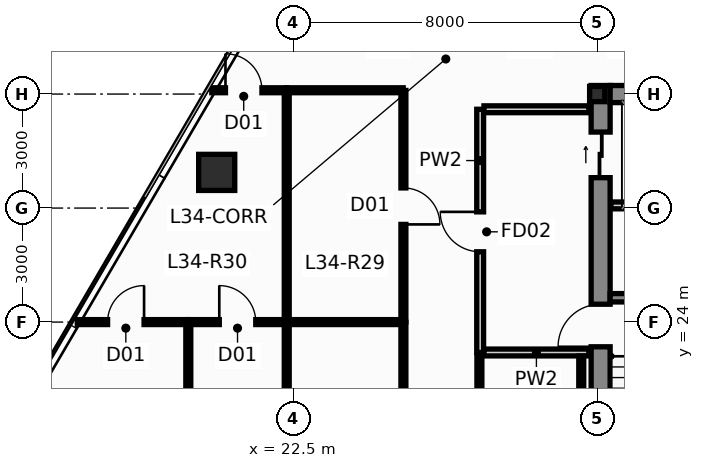
"""IFC4 building model, lengths in metres.
Left out: names, types, materials, properties, quantities, classifications, styles, units other than length and angle.
Written with IfcOpenShell. Run it as: python <this file> out.ifc"""

import sys

from ifc_helpers import new_model, si_unit, direction, frame, frame_2d, origin, origin_2d, place, context, subcontext, project, spatial, rectangle, hollow_rectangle, i_section, extrude, source, transform, mapped, element, fill, save


model = new_model("IFC4")
c1 = context("Model", 3, precision=1e-05, world=origin(), true_north=direction((0.0, 1.0)))
c2 = subcontext(c1, "Body", "Model", "MODEL_VIEW")
j1 = project(units=[si_unit("LENGTHUNIT", "METRE"), si_unit("PLANEANGLEUNIT", "RADIAN")], contexts=[c1])
p1 = place(None, origin())
s1 = spatial("IfcSite", under=j1, at=p1, CompositionType="ELEMENT")
p2 = place(p1, origin())
s2 = spatial("IfcBuilding", under=s1, at=p2, CompositionType="ELEMENT")
p3 = place(p2, frame((0.0, 0.0, 131.8)))
s3 = spatial("IfcBuildingStorey", under=s2, at=p3, CompositionType="ELEMENT", Elevation=131.8)
m1 = source(origin(), c2, "Body", "SweptSolid", [
    extrude(i_section(OverallWidth=0.4, OverallDepth=0.4, WebThickness=0.02, FlangeThickness=0.032, at=origin_2d()), origin(), (0.0, 0.0, 1.0), 3.65),
])
p4 = place(p3, frame((30.5, 30.0, 0.0), z_axis=(0.0, 0.0, 1.0), x_axis=(1.0, 0.0, 0.0)))
e1 = element("IfcColumn", 1, at=p4, inside=s3, PredefinedType="COLUMN", context=c2, shape_type="MappedRepresentation", body=[
    mapped(m1, transform((0.0, 0.0, 0.0), scale=1.0)),
])
p5 = place(p3, frame((30.59, 16.95, 0.0), z_axis=(0.0, 0.0, 1.0), x_axis=(0.0, 1.0, 0.0)))
e2 = element("IfcWall", 2, at=p5, inside=s3, PredefinedType="SHEAR", context=c2, shape_type="SweptSolid", body=[
    extrude(rectangle(XDim=13.275, YDim=0.5, at=frame_2d((6.638, 0.0))), origin(), (0.0, 0.0, 1.0), 3.65),
])
p6 = place(p5, frame((6.4, 0.0, 0.0)))
e3 = element("IfcOpeningElement", 3, at=p6, cuts=e2, PredefinedType="OPENING", context=c2, shape_type="SweptSolid", body=[
    extrude(rectangle(XDim=1.12, YDim=2.15, at=frame_2d((0.56, 1.075))), frame((0.0, 0.262, 0.0), z_axis=(0.0, -1.0, 0.0), x_axis=(1.0, 0.0, 0.0)), (0.0, 0.0, 1.0), 0.524),
])
p7 = place(p5, frame((10.85, 0.0, 0.0)))
e4 = element("IfcOpeningElement", 4, at=p7, cuts=e2, PredefinedType="OPENING", context=c2, shape_type="SweptSolid", body=[
    extrude(rectangle(XDim=1.2, YDim=2.2, at=frame_2d((0.6, 1.1))), frame((0.0, 0.262, 0.0), z_axis=(0.0, -1.0, 0.0), x_axis=(1.0, 0.0, 0.0)), (0.0, 0.0, 1.0), 0.524),
])
p8 = place(p3, frame((30.84, 30.0, 0.0), z_axis=(0.0, 0.0, 1.0), x_axis=(1.0, 0.0, 0.0)))
e5 = element("IfcWall", 5, at=p8, inside=s3, PredefinedType="SHEAR", context=c2, shape_type="SweptSolid", body=[
    extrude(rectangle(XDim=2.9, YDim=0.45, at=frame_2d((1.45, 0.0))), origin(), (0.0, 0.0, 1.0), 3.65),
])
p9 = place(p3, frame((30.84, 24.64, 0.0), z_axis=(0.0, 0.0, 1.0), x_axis=(1.0, 0.0, 0.0)))
e6 = element("IfcWall", 6, at=p9, inside=s3, PredefinedType="SHEAR", context=c2, shape_type="SweptSolid", body=[
    extrude(rectangle(XDim=2.9, YDim=0.22, at=frame_2d((1.45, 0.0))), origin(), (0.0, 0.0, 1.0), 3.65),
])
m2 = source(origin(), c2, "Body", "SweptSolid", [
    extrude(hollow_rectangle(XDim=0.95, YDim=0.95, WallThickness=0.05, at=origin_2d()), origin(), (0.0, 0.0, 1.0), 3.651),
])
p10 = place(p3, frame((20.487, 27.939, 0.0), z_axis=(0.014913313399, -0.013776424037, 0.999793880369), x_axis=(0.678553674548, 0.734550822447, 0.0)))
e7 = element("IfcColumn", 7, at=p10, inside=s3, PredefinedType="COLUMN", context=c2, shape_type="MappedRepresentation", body=[
    mapped(m2, transform((0.0, 0.0, 0.0), scale=1.0)),
])
p11 = place(p3, frame((27.42, 23.2, 0.0), z_axis=(0.0, 0.0, 1.0), x_axis=(0.0, 1.0, 0.0)))
e8 = element("IfcWall", 8, at=p11, inside=s3, PredefinedType="PARTITIONING", context=c2, shape_type="SweptSolid", body=[
    extrude(rectangle(XDim=6.4, YDim=0.18, at=frame_2d((3.2, 0.0))), origin(), (0.0, 0.0, 1.0), 3.078),
])
p12 = place(p11, frame((2.65, 0.0, 0.0)))
e9 = element("IfcOpeningElement", 9, at=p12, cuts=e8, PredefinedType="OPENING", context=c2, shape_type="SweptSolid", body=[
    extrude(rectangle(XDim=1.05, YDim=2.15, at=frame_2d((0.525, 1.075))), frame((0.0, 0.102, 0.0), z_axis=(0.0, -1.0, 0.0), x_axis=(1.0, 0.0, 0.0)), (0.0, 0.0, 1.0), 0.204),
])
p13 = place(p3, frame((27.52, 23.2, 0.0), z_axis=(0.0, 0.0, 1.0), x_axis=(1.0, 0.0, 0.0)))
e10 = element("IfcWall", 10, at=p13, inside=s3, PredefinedType="PARTITIONING", context=c2, shape_type="SweptSolid", body=[
    extrude(rectangle(XDim=2.76, YDim=0.18, at=frame_2d((1.38, 0.0))), origin(), (0.0, 0.0, 1.0), 3.4),
])
p14 = place(p3, frame((27.52, 29.6, 0.0), z_axis=(0.0, 0.0, 1.0), x_axis=(1.0, 0.0, 0.0)))
e11 = element("IfcWall", 11, at=p14, inside=s3, PredefinedType="PARTITIONING", context=c2, shape_type="SweptSolid", body=[
    extrude(rectangle(XDim=2.76, YDim=0.18, at=frame_2d((1.38, 0.0))), origin(), (0.0, 0.0, 1.0), 2.925),
])
p15 = place(p3, frame((30.86, 27.07, 0.0), z_axis=(0.0, 0.0, 1.0), x_axis=(1.0, 0.0, 0.0)))
e12 = element("IfcWall", 12, at=p15, inside=s3, PredefinedType="PARTITIONING", context=c2, shape_type="SweptSolid", body=[
    extrude(rectangle(XDim=2.9, YDim=0.18, at=frame_2d((1.45, 0.0))), origin(), (0.0, 0.0, 1.0), 3.4),
])
p16 = place(p3, frame((19.74, 5.697, 0.0), z_axis=(0.0, 0.0, 1.0), x_axis=(0.0, 1.0, 0.0)))
e13 = element("IfcWall", 13, at=p16, inside=s3, PredefinedType="PARTITIONING", context=c2, shape_type="SweptSolid", body=[
    extrude(rectangle(XDim=18.299, YDim=0.13, at=frame_2d((9.149, 0.0))), origin(), (0.0, 0.0, 1.0), 3.4),
])
p17 = place(p3, frame((22.33, 5.729, 0.0), z_axis=(0.0, 0.0, 1.0), x_axis=(0.0, 1.0, 0.0)))
e14 = element("IfcWall", 14, at=p17, inside=s3, PredefinedType="PARTITIONING", context=c2, shape_type="SweptSolid", body=[
    extrude(rectangle(XDim=18.266, YDim=0.13, at=frame_2d((9.133, 0.0))), origin(), (0.0, 0.0, 1.0), 3.078),
])
p18 = place(p3, frame((30.08, 5.826, 0.0), z_axis=(0.0, 0.0, 1.0), x_axis=(0.0, 1.0, 0.0)))
e15 = element("IfcWall", 15, at=p18, inside=s3, PredefinedType="PARTITIONING", context=c2, shape_type="SweptSolid", body=[
    extrude(rectangle(XDim=17.279, YDim=0.13, at=frame_2d((8.639, 0.0))), origin(), (0.0, 0.0, 1.0), 2.925),
])
p19 = place(p18, frame((8.207, 0.0, 0.0)))
e16 = element("IfcOpeningElement", 16, at=p19, cuts=e15, PredefinedType="OPENING", context=c2, shape_type="SweptSolid", body=[
    extrude(rectangle(XDim=0.96, YDim=2.15, at=frame_2d((0.48, 1.075))), frame((0.0, 0.077, 0.0), z_axis=(0.0, -1.0, 0.0), x_axis=(1.0, 0.0, 0.0)), (0.0, 0.0, 1.0), 0.154),
])
p20 = place(p3, frame((25.4, 15.205, 0.0), z_axis=(0.0, 0.0, 1.0), x_axis=(0.0, 1.0, 0.0)))
e17 = element("IfcWall", 17, at=p20, inside=s3, PredefinedType="PARTITIONING", context=c2, shape_type="SweptSolid", body=[
    extrude(rectangle(XDim=8.79, YDim=0.13, at=frame_2d((4.395, 0.0))), origin(), (0.0, 0.0, 1.0), 3.078),
])
p21 = place(p20, frame((3.915, 0.0, 0.0)))
e18 = element("IfcOpeningElement", 18, at=p21, cuts=e17, PredefinedType="OPENING", context=c2, shape_type="SweptSolid", body=[
    extrude(rectangle(XDim=0.96, YDim=2.15, at=frame_2d((0.48, 1.075))), frame((0.0, 0.077, 0.0), z_axis=(0.0, -1.0, 0.0), x_axis=(1.0, 0.0, 0.0)), (0.0, 0.0, 1.0), 0.154),
])
p22 = place(p3, frame((27.4, 15.205, 0.0), z_axis=(0.0, 0.0, 1.0), x_axis=(0.0, 1.0, 0.0)))
e19 = element("IfcWall", 19, at=p22, inside=s3, PredefinedType="PARTITIONING", context=c2, shape_type="SweptSolid", body=[
    extrude(rectangle(XDim=7.9, YDim=0.13, at=frame_2d((3.95, 0.0))), origin(), (0.0, 0.0, 1.0), 3.4),
])
p23 = place(p22, frame((3.47, 0.0, 0.0)))
e20 = element("IfcOpeningElement", 20, at=p23, cuts=e19, PredefinedType="OPENING", context=c2, shape_type="SweptSolid", body=[
    extrude(rectangle(XDim=0.96, YDim=2.15, at=frame_2d((0.48, 1.075))), frame((0.0, 0.077, 0.0), z_axis=(0.0, -1.0, 0.0), x_axis=(1.0, 0.0, 0.0)), (0.0, 0.0, 1.0), 0.154),
])
p24 = place(p3, frame((25.4, 30.095, 0.0), z_axis=(0.0, 0.0, 1.0), x_axis=(0.0, -1.0, 0.0)))
e21 = element("IfcWall", 21, at=p24, inside=s3, PredefinedType="PARTITIONING", context=c2, shape_type="SweptSolid", body=[
    extrude(rectangle(XDim=6.09, YDim=0.13, at=frame_2d((3.045, 0.0))), origin(), (0.0, 0.0, 1.0), 3.078),
])
p25 = place(p24, frame((2.565, 0.0, 0.0)))
e22 = element("IfcOpeningElement", 22, at=p25, cuts=e21, PredefinedType="OPENING", context=c2, shape_type="SweptSolid", body=[
    extrude(rectangle(XDim=0.96, YDim=2.15, at=frame_2d((0.48, 1.075))), frame((0.0, 0.077, 0.0), z_axis=(0.0, -1.0, 0.0), x_axis=(1.0, 0.0, 0.0)), (0.0, 0.0, 1.0), 0.154),
])
p26 = place(p3, frame((22.33, 24.005, 0.0), z_axis=(0.0, 0.0, 1.0), x_axis=(0.0, 1.0, 0.0)))
e23 = element("IfcWall", 23, at=p26, inside=s3, PredefinedType="PARTITIONING", context=c2, shape_type="SweptSolid", body=[
    extrude(rectangle(XDim=6.09, YDim=0.13, at=frame_2d((3.045, 0.0))), origin(), (0.0, 0.0, 1.0), 3.078),
])
for number, where, z_axis, x_axis in (
    (24, (22.335, 30.1, 0.0), (0.0, 0.0, 1.0), (1.0, 0.0, 0.0)),
    (25, (22.335, 24.0, 0.0), (0.0, 0.0, 1.0), (1.0, 0.0, 0.0)),
):
    element("IfcWall", number, at=place(p3, frame(where, z_axis=z_axis, x_axis=x_axis)), inside=s3, PredefinedType="PARTITIONING", context=c2, shape_type="SweptSolid", body=[
        extrude(rectangle(XDim=3.06, YDim=0.13, at=frame_2d((1.53, 0.0))), origin(), (0.0, 0.0, 1.0), 3.4),
    ])
p27 = place(p3, frame((19.745, 24.0, 0.0), z_axis=(0.0, 0.0, 1.0), x_axis=(1.0, 0.0, 0.0)))
e26 = element("IfcWall", 26, at=p27, inside=s3, PredefinedType="PARTITIONING", context=c2, shape_type="SweptSolid", body=[
    extrude(rectangle(XDim=2.58, YDim=0.13, at=frame_2d((1.29, 0.0))), origin(), (0.0, 0.0, 1.0), 3.4),
])
p28 = place(p27, frame((0.81, 0.0, 0.0)))
e27 = element("IfcOpeningElement", 27, at=p28, cuts=e26, PredefinedType="OPENING", context=c2, shape_type="SweptSolid", body=[
    extrude(rectangle(XDim=0.96, YDim=2.15, at=frame_2d((0.48, 1.075))), frame((0.0, 0.077, 0.0), z_axis=(0.0, -1.0, 0.0), x_axis=(1.0, 0.0, 0.0)), (0.0, 0.0, 1.0), 0.154),
])
p29 = place(p3, frame((16.819, 24.0, 0.0), z_axis=(0.0, 0.0, 1.0), x_axis=(1.0, 0.0, 0.0)))
e28 = element("IfcWall", 28, at=p29, inside=s3, PredefinedType="PARTITIONING", context=c2, shape_type="SweptSolid", body=[
    extrude(rectangle(XDim=2.916, YDim=0.13, at=frame_2d((1.458, 0.0))), origin(), (0.0, 0.0, 1.0), 3.4),
])
p30 = place(p29, frame((0.797, 0.0, 0.0)))
e29 = element("IfcOpeningElement", 29, at=p30, cuts=e28, PredefinedType="OPENING", context=c2, shape_type="SweptSolid", body=[
    extrude(rectangle(XDim=0.96, YDim=2.15, at=frame_2d((0.48, 1.075))), frame((0.0, 0.077, 0.0), z_axis=(0.0, -1.0, 0.0), x_axis=(1.0, 0.0, 0.0)), (0.0, 0.0, 1.0), 0.154),
])
p31 = place(p3, frame((20.358, 30.1, 0.0), z_axis=(0.0, 0.0, 1.0), x_axis=(1.0, 0.0, 0.0)))
e30 = element("IfcWall", 30, at=p31, inside=s3, PredefinedType="PARTITIONING", context=c2, shape_type="SweptSolid", body=[
    extrude(rectangle(XDim=1.967, YDim=0.13, at=frame_2d((0.983, 0.0))), origin(), (0.0, 0.0, 1.0), 3.4),
])
p32 = place(p31, frame((0.36, 0.0, 0.0)))
e31 = element("IfcOpeningElement", 31, at=p32, cuts=e30, PredefinedType="OPENING", context=c2, shape_type="SweptSolid", body=[
    extrude(rectangle(XDim=0.96, YDim=2.15, at=frame_2d((0.48, 1.075))), frame((0.0, 0.077, 0.0), z_axis=(0.0, -1.0, 0.0), x_axis=(1.0, 0.0, 0.0)), (0.0, 0.0, 1.0), 0.154),
])
p33 = place(p6, origin())
e32 = element("IfcDoor", 32, at=p33, inside=s3, OperationType="SINGLE_SWING_LEFT", PredefinedType="DOOR", context=c2, shape_type="SweptSolid", body=[
    extrude(rectangle(XDim=1.12, YDim=2.15, at=frame_2d((0.56, 1.075))), frame((0.0, 0.025, 0.0), z_axis=(0.0, -1.0, 0.0), x_axis=(1.0, 0.0, 0.0)), (0.0, 0.0, 1.0), 0.05),
])
fill(e3, e32)
p34 = place(p7, origin())
e33 = element("IfcDoor", 33, at=p34, inside=s3, OperationType="SLIDING_TO_LEFT", PredefinedType="DOOR", context=c2, shape_type="SweptSolid", body=[
    extrude(rectangle(XDim=1.2, YDim=2.2, at=frame_2d((0.6, 1.1))), frame((0.0, 0.025, 0.0), z_axis=(0.0, -1.0, 0.0), x_axis=(1.0, 0.0, 0.0)), (0.0, 0.0, 1.0), 0.05),
])
fill(e4, e33)
p35 = place(p12, origin())
e34 = element("IfcDoor", 34, at=p35, inside=s3, OperationType="SINGLE_SWING_RIGHT", PredefinedType="DOOR", context=c2, shape_type="SweptSolid", body=[
    extrude(rectangle(XDim=1.05, YDim=2.15, at=frame_2d((0.525, 1.075))), frame((0.0, 0.025, 0.0), z_axis=(0.0, -1.0, 0.0), x_axis=(1.0, 0.0, 0.0)), (0.0, 0.0, 1.0), 0.05),
])
fill(e9, e34)
p36 = place(p25, origin())
e35 = element("IfcDoor", 35, at=p36, inside=s3, OperationType="SINGLE_SWING_RIGHT", PredefinedType="DOOR", context=c2, shape_type="SweptSolid", body=[
    extrude(rectangle(XDim=0.96, YDim=2.15, at=frame_2d((0.48, 1.075))), frame((0.0, 0.025, 0.0), z_axis=(0.0, -1.0, 0.0), x_axis=(1.0, 0.0, 0.0)), (0.0, 0.0, 1.0), 0.05),
])
fill(e22, e35)
p37 = place(p28, origin())
e36 = element("IfcDoor", 36, at=p37, inside=s3, OperationType="SINGLE_SWING_LEFT", PredefinedType="DOOR", context=c2, shape_type="SweptSolid", body=[
    extrude(rectangle(XDim=0.96, YDim=2.15, at=frame_2d((0.48, 1.075))), frame((0.0, 0.025, 0.0), z_axis=(0.0, -1.0, 0.0), x_axis=(1.0, 0.0, 0.0)), (0.0, 0.0, 1.0), 0.05),
])
fill(e27, e36)
p38 = place(p30, origin())
e37 = element("IfcDoor", 37, at=p38, inside=s3, OperationType="SINGLE_SWING_RIGHT", PredefinedType="DOOR", context=c2, shape_type="SweptSolid", body=[
    extrude(rectangle(XDim=0.96, YDim=2.15, at=frame_2d((0.48, 1.075))), frame((0.0, 0.025, 0.0), z_axis=(0.0, -1.0, 0.0), x_axis=(1.0, 0.0, 0.0)), (0.0, 0.0, 1.0), 0.05),
])
fill(e29, e37)
p39 = place(p32, origin())
e38 = element("IfcDoor", 38, at=p39, inside=s3, OperationType="SINGLE_SWING_LEFT", PredefinedType="DOOR", context=c2, shape_type="SweptSolid", body=[
    extrude(rectangle(XDim=0.96, YDim=2.15, at=frame_2d((0.48, 1.075))), frame((0.0, 0.025, 0.0), z_axis=(0.0, -1.0, 0.0), x_axis=(1.0, 0.0, 0.0)), (0.0, 0.0, 1.0), 0.05),
])
fill(e31, e38)
save(model, sys.argv[1])
